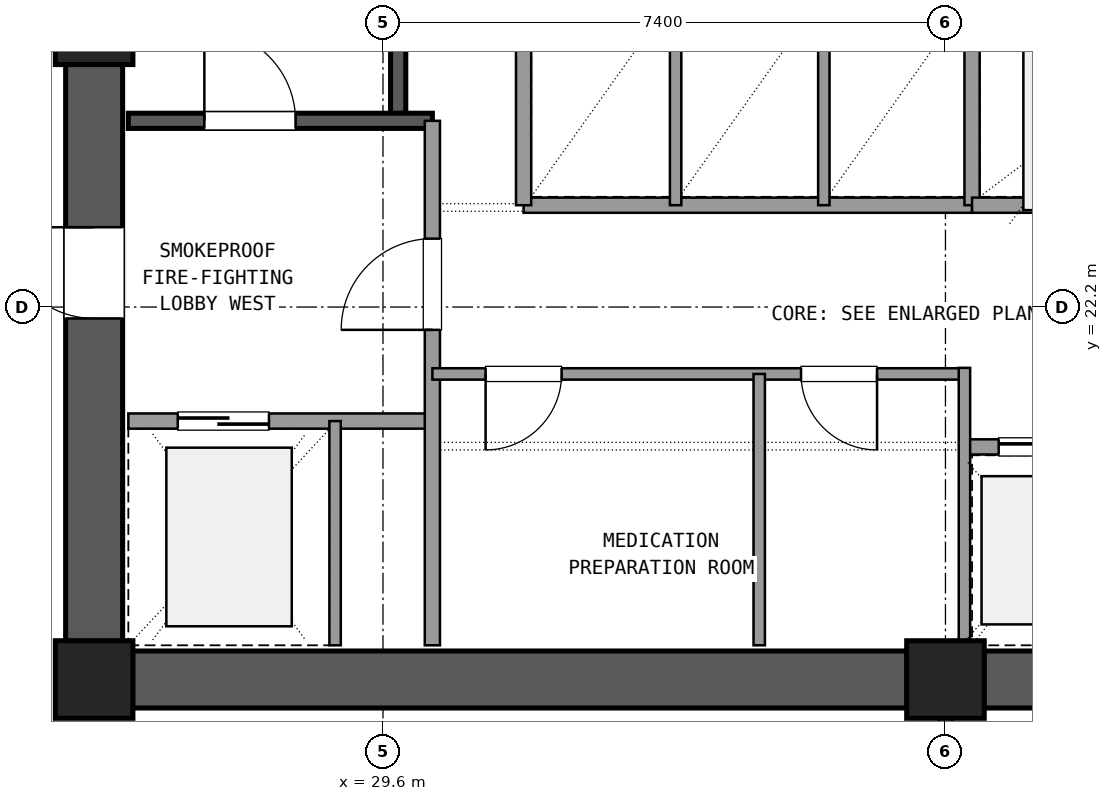
"""IFC4 building model, lengths in metres.
Left out: names, types, materials, properties, quantities, classifications, styles, units other than length and angle.
Written with IfcOpenShell. Run it as: python <this file> out.ifc"""

import sys

from ifc_helpers import new_model, si_unit, direction, frame, frame_2d, origin, origin_2d, place, context, subcontext, project, spatial, rectangle, extrude, element, fill, save


model = new_model("IFC4")
c1 = context("Model", 3, precision=1e-05, world=origin(), true_north=direction((0.0, 1.0)))
c2 = subcontext(c1, "Body", "Model", "MODEL_VIEW")
j1 = project(units=[si_unit("LENGTHUNIT", "METRE"), si_unit("PLANEANGLEUNIT", "RADIAN")], contexts=[c1])
p1 = place(None, origin())
s1 = spatial("IfcSite", under=j1, at=p1, CompositionType="ELEMENT")
p2 = place(p1, origin())
s2 = spatial("IfcBuilding", under=s1, at=p2, CompositionType="ELEMENT")
p3 = place(p2, frame((0.0, 0.0, 174.42)))
s3 = spatial("IfcBuildingStorey", under=s2, at=p3, CompositionType="ELEMENT", Elevation=174.42)
for number, where, z_axis, x_axis in (
    (1, (25.8, 17.3, 0.0), (0.0, 0.0, 1.0), (1.0, 0.0, 0.0)),
    (2, (37.0, 17.3, 0.0), (0.0, 0.0, 1.0), (1.0, 0.0, 0.0)),
    (3, (25.8, 25.9, 0.0), (0.0, 0.0, 1.0), (1.0, 0.0, 0.0)),
):
    element("IfcColumn", number, at=place(p3, frame(where, z_axis=z_axis, x_axis=x_axis)), inside=s3, PredefinedType="COLUMN", context=c2, shape_type="SweptSolid", body=[
        extrude(rectangle(XDim=1.02, YDim=1.02, at=origin_2d()), origin(), (0.0, 0.0, 1.0), 3.6),
    ])
for number, where, z_axis, x_axis in (
    (4, (26.305, 17.3, 0.0), (0.0, 0.0, 1.0), (1.0, 0.0, 0.0)),
    (5, (37.505, 17.3, 0.0), (0.0, 0.0, 1.0), (1.0, 0.0, 0.0)),
):
    element("IfcWall", number, at=place(p3, frame(where, z_axis=z_axis, x_axis=x_axis)), inside=s3, PredefinedType="SHEAR", context=c2, shape_type="SweptSolid", body=[
        extrude(rectangle(XDim=10.19, YDim=0.75, at=frame_2d((5.095, 0.0))), origin(), (0.0, 0.0, 1.0), 3.3),
    ])
p4 = place(p3, frame((25.8, 25.395, 0.0), z_axis=(0.0, 0.0, 1.0), x_axis=(0.0, -1.0, 0.0)))
e6 = element("IfcWall", 6, at=p4, inside=s3, PredefinedType="SHEAR", context=c2, shape_type="SweptSolid", body=[
    extrude(rectangle(XDim=7.59, YDim=0.75, at=frame_2d((3.795, 0.0))), origin(), (0.0, 0.0, 1.0), 3.3),
])
p5 = place(p4, frame((2.145, 0.0, 0.0)))
e7 = element("IfcOpeningElement", 7, at=p5, cuts=e6, PredefinedType="OPENING", context=c2, shape_type="SweptSolid", body=[
    extrude(rectangle(XDim=1.2, YDim=2.15, at=frame_2d((0.6, 1.075))), frame((0.0, 0.385, 0.0), z_axis=(0.0, -1.0, 0.0), x_axis=(1.0, 0.0, 0.0)), (0.0, 0.0, 1.0), 0.77),
])
p6 = place(p3, frame((29.8, 24.65, 0.0), z_axis=(0.0, 0.0, 1.0), x_axis=(0.0, 1.0, 0.0)))
e8 = element("IfcWall", 8, at=p6, inside=s3, PredefinedType="SHEAR", context=c2, shape_type="SweptSolid", body=[
    extrude(rectangle(XDim=9.4, YDim=0.2, at=frame_2d((4.7, 0.0))), origin(), (0.0, 0.0, 1.0), 3.3),
])
p7 = place(p3, frame((26.25, 24.65, 0.0), z_axis=(0.0, 0.0, 1.0), x_axis=(1.0, 0.0, 0.0)))
e9 = element("IfcWall", 9, at=p7, inside=s3, PredefinedType="SHEAR", context=c2, shape_type="SweptSolid", body=[
    extrude(rectangle(XDim=4.0, YDim=0.2, at=frame_2d((2.0, 0.0))), origin(), (0.0, 0.0, 1.0), 3.3),
])
p8 = place(p7, frame((1.0, 0.0, 0.0)))
e10 = element("IfcOpeningElement", 10, at=p8, cuts=e9, PredefinedType="OPENING", context=c2, shape_type="SweptSolid", body=[
    extrude(rectangle(XDim=1.2, YDim=2.15, at=frame_2d((0.6, 1.075))), frame((0.0, 0.11, 0.0), z_axis=(0.0, -1.0, 0.0), x_axis=(1.0, 0.0, 0.0)), (0.0, 0.0, 1.0), 0.22),
])
p9 = place(p3, frame((26.25, 20.7, 0.0), z_axis=(0.0, 0.0, 1.0), x_axis=(1.0, 0.0, 0.0)))
e11 = element("IfcWall", 11, at=p9, inside=s3, PredefinedType="SOLIDWALL", context=c2, shape_type="SweptSolid", body=[
    extrude(rectangle(XDim=4.0, YDim=0.2, at=frame_2d((2.0, 0.0))), origin(), (0.0, 0.0, 1.0), 2.59),
])
p10 = place(p9, frame((0.65, 0.0, 0.0)))
e12 = element("IfcOpeningElement", 12, at=p10, cuts=e11, PredefinedType="OPENING", context=c2, shape_type="SweptSolid", body=[
    extrude(rectangle(XDim=1.2, YDim=2.15, at=frame_2d((0.6, 1.075))), frame((0.0, 0.11, 0.0), z_axis=(0.0, -1.0, 0.0), x_axis=(1.0, 0.0, 0.0)), (0.0, 0.0, 1.0), 0.22),
])
p11 = place(p3, frame((30.25, 17.75, 0.0), z_axis=(0.0, 0.0, 1.0), x_axis=(0.0, 1.0, 0.0)))
e13 = element("IfcWall", 13, at=p11, inside=s3, PredefinedType="SOLIDWALL", context=c2, shape_type="SweptSolid", body=[
    extrude(rectangle(XDim=6.9, YDim=0.2, at=frame_2d((3.45, 0.0))), origin(), (0.0, 0.0, 1.0), 2.59),
])
p12 = place(p11, frame((4.15, 0.0, 0.0)))
e14 = element("IfcOpeningElement", 14, at=p12, cuts=e13, PredefinedType="OPENING", context=c2, shape_type="SweptSolid", body=[
    extrude(rectangle(XDim=1.2, YDim=2.15, at=frame_2d((0.6, 1.075))), frame((0.0, 0.11, 0.0), z_axis=(0.0, -1.0, 0.0), x_axis=(1.0, 0.0, 0.0)), (0.0, 0.0, 1.0), 0.22),
])
p13 = place(p3, frame((28.97, 17.75, 0.0), z_axis=(0.0, 0.0, 1.0), x_axis=(0.0, 1.0, 0.0)))
e15 = element("IfcWall", 15, at=p13, inside=s3, PredefinedType="PARTITIONING", context=c2, shape_type="SweptSolid", body=[
    extrude(rectangle(XDim=2.95, YDim=0.15, at=frame_2d((1.475, 0.0))), origin(), (0.0, 0.0, 1.0), 2.59),
])
p14 = place(p3, frame((30.25, 21.32, 0.0), z_axis=(0.0, 0.0, 1.0), x_axis=(1.0, 0.0, 0.0)))
e16 = element("IfcWall", 16, at=p14, inside=s3, PredefinedType="PARTITIONING", context=c2, shape_type="SweptSolid", body=[
    extrude(rectangle(XDim=7.0, YDim=0.15, at=frame_2d((3.5, 0.0))), origin(), (0.0, 0.0, 1.0), 2.59),
])
p15 = place(p14, frame((0.7, 0.0, 0.0)))
e17 = element("IfcOpeningElement", 17, at=p15, cuts=e16, PredefinedType="OPENING", context=c2, shape_type="SweptSolid", body=[
    extrude(rectangle(XDim=1.0, YDim=2.15, at=frame_2d((0.5, 1.075))), frame((0.0, 0.085, 0.0), z_axis=(0.0, -1.0, 0.0), x_axis=(1.0, 0.0, 0.0)), (0.0, 0.0, 1.0), 0.17),
])
p16 = place(p14, frame((4.85, 0.0, 0.0)))
e18 = element("IfcOpeningElement", 18, at=p16, cuts=e16, PredefinedType="OPENING", context=c2, shape_type="SweptSolid", body=[
    extrude(rectangle(XDim=1.0, YDim=2.15, at=frame_2d((0.5, 1.075))), frame((0.0, 0.085, 0.0), z_axis=(0.0, -1.0, 0.0), x_axis=(1.0, 0.0, 0.0)), (0.0, 0.0, 1.0), 0.17),
])
p17 = place(p3, frame((34.55, 17.75, 0.0), z_axis=(0.0, 0.0, 1.0), x_axis=(0.0, 1.0, 0.0)))
e19 = element("IfcWall", 19, at=p17, inside=s3, PredefinedType="PARTITIONING", context=c2, shape_type="SweptSolid", body=[
    extrude(rectangle(XDim=3.57, YDim=0.15, at=frame_2d((1.785, 0.0))), origin(), (0.0, 0.0, 1.0), 2.59),
])
p18 = place(p3, frame((37.25, 20.36, 0.0), z_axis=(0.0, 0.0, 1.0), x_axis=(1.0, 0.0, 0.0)))
e20 = element("IfcWall", 20, at=p18, inside=s3, PredefinedType="SOLIDWALL", context=c2, shape_type="SweptSolid", body=[
    extrude(rectangle(XDim=6.1, YDim=0.2, at=frame_2d((3.05, 0.0))), origin(), (0.0, 0.0, 1.0), 2.59),
])
p19 = place(p18, frame((0.45, 0.0, 0.0)))
e21 = element("IfcOpeningElement", 21, at=p19, cuts=e20, PredefinedType="OPENING", context=c2, shape_type="SweptSolid", body=[
    extrude(rectangle(XDim=1.1, YDim=2.15, at=frame_2d((0.55, 1.075))), frame((0.0, 0.11, 0.0), z_axis=(0.0, -1.0, 0.0), x_axis=(1.0, 0.0, 0.0)), (0.0, 0.0, 1.0), 0.22),
])
p20 = place(p18, frame((2.5, 0.0, 0.0)))
e22 = element("IfcOpeningElement", 22, at=p20, cuts=e20, PredefinedType="OPENING", context=c2, shape_type="SweptSolid", body=[
    extrude(rectangle(XDim=1.1, YDim=2.15, at=frame_2d((0.55, 1.075))), frame((0.0, 0.11, 0.0), z_axis=(0.0, -1.0, 0.0), x_axis=(1.0, 0.0, 0.0)), (0.0, 0.0, 1.0), 0.22),
])
p21 = place(p18, frame((4.55, 0.0, 0.0)))
e23 = element("IfcOpeningElement", 23, at=p21, cuts=e20, PredefinedType="OPENING", context=c2, shape_type="SweptSolid", body=[
    extrude(rectangle(XDim=1.1, YDim=2.15, at=frame_2d((0.55, 1.075))), frame((0.0, 0.11, 0.0), z_axis=(0.0, -1.0, 0.0), x_axis=(1.0, 0.0, 0.0)), (0.0, 0.0, 1.0), 0.22),
])
p22 = place(p3, frame((37.25, 17.75, 0.0), z_axis=(0.0, 0.0, 1.0), x_axis=(0.0, 1.0, 0.0)))
e24 = element("IfcWall", 24, at=p22, inside=s3, PredefinedType="PARTITIONING", context=c2, shape_type="SweptSolid", body=[
    extrude(rectangle(XDim=3.65, YDim=0.15, at=frame_2d((1.825, 0.0))), origin(), (0.0, 0.0, 1.0), 2.59),
])
p23 = place(p3, frame((31.45, 23.54, 0.0), z_axis=(0.0, 0.0, 1.0), x_axis=(1.0, 0.0, 0.0)))
e25 = element("IfcWall", 25, at=p23, inside=s3, PredefinedType="SOLIDWALL", context=c2, shape_type="SweptSolid", body=[
    extrude(rectangle(XDim=5.9, YDim=0.2, at=frame_2d((2.95, 0.0))), origin(), (0.0, 0.0, 1.0), 2.59),
])
p24 = place(p3, frame((31.45, 23.54, 0.0), z_axis=(0.0, 0.0, 1.0), x_axis=(0.0, 1.0, 0.0)))
e26 = element("IfcWall", 26, at=p24, inside=s3, PredefinedType="SOLIDWALL", context=c2, shape_type="SweptSolid", body=[
    extrude(rectangle(XDim=2.81, YDim=0.2, at=frame_2d((1.405, 0.0))), origin(), (0.0, 0.0, 1.0), 2.59),
])
for number, where, z_axis, x_axis in (
    (27, (33.45, 23.54, 0.0), (0.0, 0.0, 1.0), (0.0, 1.0, 0.0)),
    (28, (35.4, 23.54, 0.0), (0.0, 0.0, 1.0), (0.0, 1.0, 0.0)),
):
    element("IfcWall", number, at=place(p3, frame(where, z_axis=z_axis, x_axis=x_axis)), inside=s3, PredefinedType="PARTITIONING", context=c2, shape_type="SweptSolid", body=[
        extrude(rectangle(XDim=2.81, YDim=0.15, at=frame_2d((1.405, 0.0))), origin(), (0.0, 0.0, 1.0), 2.59),
    ])
p25 = place(p3, frame((37.35, 23.54, 0.0), z_axis=(0.0, 0.0, 1.0), x_axis=(0.0, 1.0, 0.0)))
e29 = element("IfcWall", 29, at=p25, inside=s3, PredefinedType="SOLIDWALL", context=c2, shape_type="SweptSolid", body=[
    extrude(rectangle(XDim=6.82, YDim=0.2, at=frame_2d((3.41, 0.0))), origin(), (0.0, 0.0, 1.0), 2.59),
])
p26 = place(p3, frame((37.35, 23.54, 0.0), z_axis=(0.0, 0.0, 1.0), x_axis=(1.0, 0.0, 0.0)))
e30 = element("IfcWall", 30, at=p26, inside=s3, PredefinedType="SOLIDWALL", context=c2, shape_type="SweptSolid", body=[
    extrude(rectangle(XDim=3.05, YDim=0.2, at=frame_2d((1.525, 0.0))), origin(), (0.0, 0.0, 1.0), 2.59),
])
p27 = place(p3, frame((37.0, 13.64, 0.0), z_axis=(0.0, 0.0, 1.0), x_axis=(0.0, 1.0, 0.0)))
e31 = element("IfcWall", 31, at=p27, inside=s3, PredefinedType="PARTITIONING", context=c2, shape_type="SweptSolid", body=[
    extrude(rectangle(XDim=3.21, YDim=0.18, at=frame_2d((1.605, 0.0))), origin(), (0.0, 0.0, 1.0), 2.59),
])
p28 = place(p27, frame((0.605, 0.0, 0.0)))
e32 = element("IfcOpeningElement", 32, at=p28, cuts=e31, PredefinedType="OPENING", context=c2, shape_type="SweptSolid", body=[
    extrude(rectangle(XDim=2.0, YDim=2.2, at=frame_2d((1.0, 1.1))), frame((0.0, 0.1, 0.0), z_axis=(0.0, -1.0, 0.0), x_axis=(1.0, 0.0, 0.0)), (0.0, 0.0, 1.0), 0.2),
])
p29 = place(p8, origin())
e33 = element("IfcDoor", 33, at=p29, inside=s3, OperationType="SINGLE_SWING_LEFT", PredefinedType="DOOR", context=c2, shape_type="SweptSolid", body=[
    extrude(rectangle(XDim=1.2, YDim=2.15, at=frame_2d((0.6, 1.075))), frame((0.0, 0.025, 0.0), z_axis=(0.0, -1.0, 0.0), x_axis=(1.0, 0.0, 0.0)), (0.0, 0.0, 1.0), 0.05),
])
fill(e10, e33)
p30 = place(p10, origin())
e34 = element("IfcDoor", 34, at=p30, inside=s3, OperationType="SLIDING_TO_LEFT", PredefinedType="DOOR", context=c2, shape_type="SweptSolid", body=[
    extrude(rectangle(XDim=1.2, YDim=2.15, at=frame_2d((0.6, 1.075))), frame((0.0, 0.025, 0.0), z_axis=(0.0, -1.0, 0.0), x_axis=(1.0, 0.0, 0.0)), (0.0, 0.0, 1.0), 0.05),
])
fill(e12, e34)
p31 = place(p12, origin())
e35 = element("IfcDoor", 35, at=p31, inside=s3, OperationType="SINGLE_SWING_LEFT", PredefinedType="DOOR", context=c2, shape_type="SweptSolid", body=[
    extrude(rectangle(XDim=1.2, YDim=2.15, at=frame_2d((0.6, 1.075))), frame((0.0, 0.025, 0.0), z_axis=(0.0, -1.0, 0.0), x_axis=(1.0, 0.0, 0.0)), (0.0, 0.0, 1.0), 0.05),
])
fill(e14, e35)
p32 = place(p5, frame((1.2, 0.0, 0.0), z_axis=(0.0, 0.0, 1.0), x_axis=(-1.0, 0.0, 0.0)))
e36 = element("IfcDoor", 36, at=p32, inside=s3, OperationType="SINGLE_SWING_LEFT", PredefinedType="DOOR", context=c2, shape_type="SweptSolid", body=[
    extrude(rectangle(XDim=1.2, YDim=2.15, at=frame_2d((0.6, 1.075))), frame((0.0, 0.025, 0.0), z_axis=(0.0, -1.0, 0.0), x_axis=(1.0, 0.0, 0.0)), (0.0, 0.0, 1.0), 0.05),
])
fill(e7, e36)
p33 = place(p15, frame((1.0, 0.0, 0.0), z_axis=(0.0, 0.0, 1.0), x_axis=(-1.0, 0.0, 0.0)))
e37 = element("IfcDoor", 37, at=p33, inside=s3, OperationType="SINGLE_SWING_LEFT", PredefinedType="DOOR", context=c2, shape_type="SweptSolid", body=[
    extrude(rectangle(XDim=1.0, YDim=2.15, at=frame_2d((0.5, 1.075))), frame((0.0, 0.025, 0.0), z_axis=(0.0, -1.0, 0.0), x_axis=(1.0, 0.0, 0.0)), (0.0, 0.0, 1.0), 0.05),
])
fill(e17, e37)
p34 = place(p16, frame((1.0, 0.0, 0.0), z_axis=(0.0, 0.0, 1.0), x_axis=(-1.0, 0.0, 0.0)))
e38 = element("IfcDoor", 38, at=p34, inside=s3, OperationType="SINGLE_SWING_RIGHT", PredefinedType="DOOR", context=c2, shape_type="SweptSolid", body=[
    extrude(rectangle(XDim=1.0, YDim=2.15, at=frame_2d((0.5, 1.075))), frame((0.0, 0.025, 0.0), z_axis=(0.0, -1.0, 0.0), x_axis=(1.0, 0.0, 0.0)), (0.0, 0.0, 1.0), 0.05),
])
fill(e18, e38)
p35 = place(p19, origin())
e39 = element("IfcDoor", 39, at=p35, inside=s3, OperationType="SLIDING_TO_LEFT", PredefinedType="DOOR", context=c2, shape_type="SweptSolid", body=[
    extrude(rectangle(XDim=1.1, YDim=2.15, at=frame_2d((0.55, 1.075))), frame((0.0, 0.025, 0.0), z_axis=(0.0, -1.0, 0.0), x_axis=(1.0, 0.0, 0.0)), (0.0, 0.0, 1.0), 0.05),
])
fill(e21, e39)
save(model, sys.argv[1])
